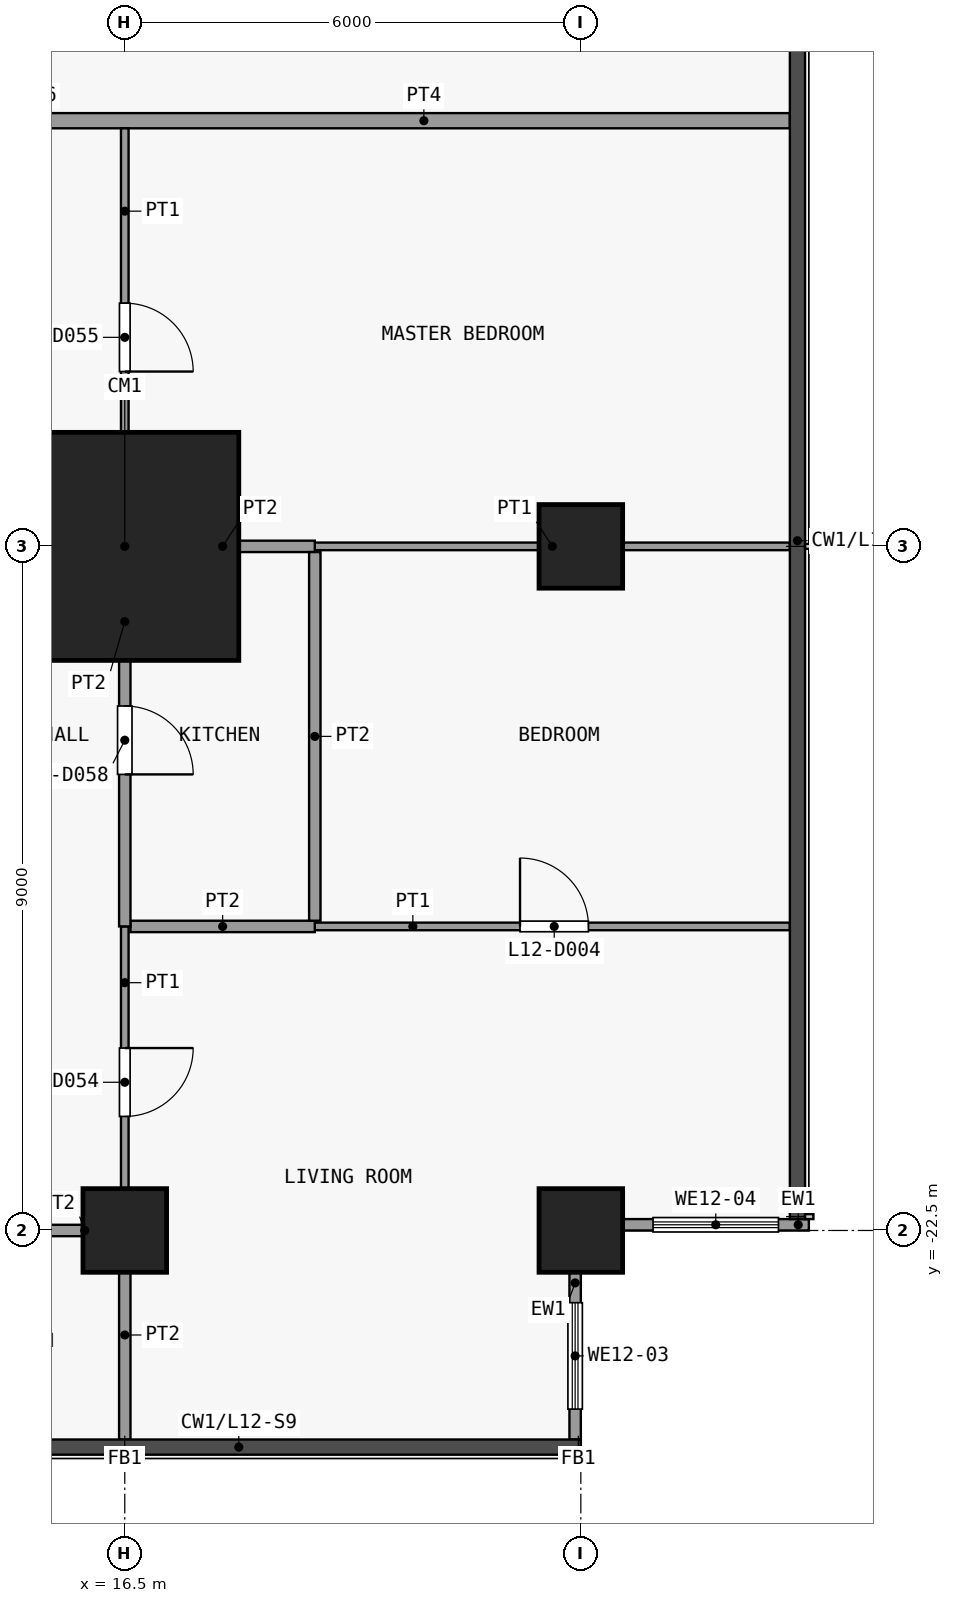
"""IFC4 building model, lengths in metres.
Left out: names, types, materials, properties, quantities, classifications, styles, units other than length and angle.
Written with IfcOpenShell. Run it as: python <this file> out.ifc"""

import sys

from ifc_helpers import new_model, si_unit, direction, frame, frame_2d, origin, origin_2d, place, context, subcontext, project, spatial, rectangle, extrude, element, fill, save


model = new_model("IFC4")
c1 = context("Model", 3, precision=1e-05, world=origin(), true_north=direction((0.0, 1.0)))
c2 = subcontext(c1, "Body", "Model", "MODEL_VIEW")
j1 = project(units=[si_unit("LENGTHUNIT", "METRE"), si_unit("PLANEANGLEUNIT", "RADIAN")], contexts=[c1])
p1 = place(None, origin())
s1 = spatial("IfcSite", under=j1, at=p1, CompositionType="ELEMENT")
p2 = place(p1, origin())
s2 = spatial("IfcBuilding", under=s1, at=p2, CompositionType="ELEMENT")
p3 = place(p2, frame((0.0, 0.0, 54.1)))
s3 = spatial("IfcBuildingStorey", under=s2, at=p3, CompositionType="ELEMENT", Elevation=54.1)
p4 = place(p3, frame((16.5, -22.5, 0.0), z_axis=(0.0, 0.0, 1.0), x_axis=(1.0, 0.0, 0.0)))
e1 = element("IfcColumn", 1, at=p4, inside=s3, PredefinedType="COLUMN", context=c2, shape_type="SweptSolid", body=[
    extrude(rectangle(XDim=1.1, YDim=1.1, at=origin_2d()), origin(), (0.0, 0.0, 1.0), 3.6),
])
p5 = place(p3, frame((16.5, -13.5, 0.0), z_axis=(0.0, 0.0, 1.0), x_axis=(1.0, 0.0, 0.0)))
e2 = element("IfcColumn", 2, at=p5, inside=s3, PredefinedType="COLUMN", context=c2, shape_type="SweptSolid", body=[
    extrude(rectangle(XDim=3.0, YDim=3.0, at=origin_2d()), origin(), (0.0, 0.0, 1.0), 3.6),
])
for number, where, z_axis, x_axis in (
    (3, (22.5, -22.5, 0.0), (0.0, 0.0, 1.0), (1.0, 0.0, 0.0)),
    (4, (22.5, -13.5, 0.0), (0.0, 0.0, 1.0), (1.0, 0.0, 0.0)),
):
    element("IfcColumn", number, at=place(p3, frame(where, z_axis=z_axis, x_axis=x_axis)), inside=s3, PredefinedType="COLUMN", context=c2, shape_type="SweptSolid", body=[
        extrude(rectangle(XDim=1.1, YDim=1.1, at=origin_2d()), origin(), (0.0, 0.0, 1.0), 3.6),
    ])
p6 = place(p3, frame((22.425, -23.05, 0.0), z_axis=(0.0, 0.0, 1.0), x_axis=(0.0, -1.0, 0.0)))
e5 = element("IfcWall", 5, at=p6, inside=s3, PredefinedType="SOLIDWALL", context=c2, shape_type="SweptSolid", body=[
    extrude(rectangle(XDim=2.2, YDim=0.15, at=frame_2d((1.1, 0.0))), origin(), (0.0, 0.0, 1.0), 3.3),
])
p7 = place(p6, frame((0.4, 0.0, 0.9)))
e6 = element("IfcOpeningElement", 6, at=p7, cuts=e5, PredefinedType="OPENING", context=c2, shape_type="SweptSolid", body=[
    extrude(rectangle(XDim=1.4, YDim=2.4, at=frame_2d((0.7, 1.2))), frame((0.0, 0.085, 0.0), z_axis=(0.0, -1.0, 0.0), x_axis=(1.0, 0.0, 0.0)), (0.0, 0.0, 1.0), 0.17),
])
p8 = place(p3, frame((25.5, -22.425, 0.0), z_axis=(0.0, 0.0, 1.0), x_axis=(-1.0, 0.0, 0.0)))
e7 = element("IfcWall", 7, at=p8, inside=s3, PredefinedType="SOLIDWALL", context=c2, shape_type="SweptSolid", body=[
    extrude(rectangle(XDim=2.45, YDim=0.15, at=frame_2d((1.225, 0.0))), origin(), (0.0, 0.0, 1.0), 3.3),
])
p9 = place(p8, frame((0.4, 0.0, 0.9)))
e8 = element("IfcOpeningElement", 8, at=p9, cuts=e7, PredefinedType="OPENING", context=c2, shape_type="SweptSolid", body=[
    extrude(rectangle(XDim=1.65, YDim=2.4, at=frame_2d((0.825, 1.2))), frame((0.0, 0.085, 0.0), z_axis=(0.0, -1.0, 0.0), x_axis=(1.0, 0.0, 0.0)), (0.0, 0.0, 1.0), 0.17),
])
p10 = place(p3, frame((13.5, -22.5, 0.0), z_axis=(0.0, 0.0, 1.0), x_axis=(1.0, 0.0, 0.0)))
e9 = element("IfcWall", 9, at=p10, inside=s3, PredefinedType="PARTITIONING", context=c2, shape_type="SweptSolid", body=[
    extrude(rectangle(XDim=2.925, YDim=0.15, at=frame_2d((1.462, 0.0))), origin(), (0.0, 0.0, 1.0), 3.3),
])
p11 = place(p10, frame((1.0, 0.0, 0.0)))
e10 = element("IfcOpeningElement", 10, at=p11, cuts=e9, PredefinedType="OPENING", context=c2, shape_type="SweptSolid", body=[
    extrude(rectangle(XDim=0.9, YDim=2.1, at=frame_2d((0.45, 1.05))), frame((0.0, 0.085, 0.0), z_axis=(0.0, -1.0, 0.0), x_axis=(1.0, 0.0, 0.0)), (0.0, 0.0, 1.0), 0.17),
])
p12 = place(p3, frame((19.0, -18.5, 0.0), z_axis=(0.0, 0.0, 1.0), x_axis=(1.0, 0.0, 0.0)))
e11 = element("IfcWall", 11, at=p12, inside=s3, PredefinedType="PARTITIONING", context=c2, shape_type="SweptSolid", body=[
    extrude(rectangle(XDim=6.25, YDim=0.1, at=frame_2d((3.125, 0.0))), origin(), (0.0, 0.0, 1.0), 3.3),
])
p13 = place(p12, frame((2.7, 0.0, 0.0)))
e12 = element("IfcOpeningElement", 12, at=p13, cuts=e11, PredefinedType="OPENING", context=c2, shape_type="SweptSolid", body=[
    extrude(rectangle(XDim=0.9, YDim=2.1, at=frame_2d((0.45, 1.05))), frame((0.0, 0.06, 0.0), z_axis=(0.0, -1.0, 0.0), x_axis=(1.0, 0.0, 0.0)), (0.0, 0.0, 1.0), 0.12),
])
p14 = place(p3, frame((16.575, -18.5, 0.0), z_axis=(0.0, 0.0, 1.0), x_axis=(1.0, 0.0, 0.0)))
e13 = element("IfcWall", 13, at=p14, inside=s3, PredefinedType="PARTITIONING", context=c2, shape_type="SweptSolid", body=[
    extrude(rectangle(XDim=2.425, YDim=0.15, at=frame_2d((1.212, 0.0))), origin(), (0.0, 0.0, 1.0), 3.3),
])
p15 = place(p3, frame((19.0, -13.5, 0.0), z_axis=(0.0, 0.0, 1.0), x_axis=(1.0, 0.0, 0.0)))
e14 = element("IfcWall", 14, at=p15, inside=s3, PredefinedType="PARTITIONING", context=c2, shape_type="SweptSolid", body=[
    extrude(rectangle(XDim=6.25, YDim=0.1, at=frame_2d((3.125, 0.0))), origin(), (0.0, 0.0, 1.0), 3.3),
])
p16 = place(p3, frame((16.575, -13.5, 0.0), z_axis=(0.0, 0.0, 1.0), x_axis=(1.0, 0.0, 0.0)))
e15 = element("IfcWall", 15, at=p16, inside=s3, PredefinedType="PARTITIONING", context=c2, shape_type="SweptSolid", body=[
    extrude(rectangle(XDim=2.425, YDim=0.15, at=frame_2d((1.212, 0.0))), origin(), (0.0, 0.0, 1.0), 3.3),
])
p17 = place(p3, frame((13.5, -7.9, 0.0), z_axis=(0.0, 0.0, 1.0), x_axis=(1.0, 0.0, 0.0)))
e16 = element("IfcWall", 16, at=p17, inside=s3, PredefinedType="PARTITIONING", context=c2, shape_type="SweptSolid", body=[
    extrude(rectangle(XDim=11.75, YDim=0.2, at=frame_2d((5.875, 0.0))), origin(), (0.0, 0.0, 1.0), 3.3),
])
p18 = place(p17, frame((1.0, 0.0, 0.0)))
e17 = element("IfcOpeningElement", 17, at=p18, cuts=e16, PredefinedType="OPENING", context=c2, shape_type="SweptSolid", body=[
    extrude(rectangle(XDim=1.0, YDim=2.1, at=frame_2d((0.5, 1.05))), frame((0.0, 0.11, 0.0), z_axis=(0.0, -1.0, 0.0), x_axis=(1.0, 0.0, 0.0)), (0.0, 0.0, 1.0), 0.22),
])
p19 = place(p3, frame((16.5, -22.5, 0.0), z_axis=(0.0, 0.0, 1.0), x_axis=(0.0, 1.0, 0.0)))
e18 = element("IfcWall", 18, at=p19, inside=s3, PredefinedType="PARTITIONING", context=c2, shape_type="SweptSolid", body=[
    extrude(rectangle(XDim=4.0, YDim=0.1, at=frame_2d((2.0, 0.0))), origin(), (0.0, 0.0, 1.0), 3.3),
])
p20 = place(p19, frame((1.5, 0.0, 0.0)))
e19 = element("IfcOpeningElement", 19, at=p20, cuts=e18, PredefinedType="OPENING", context=c2, shape_type="SweptSolid", body=[
    extrude(rectangle(XDim=0.9, YDim=2.1, at=frame_2d((0.45, 1.05))), frame((0.0, 0.06, 0.0), z_axis=(0.0, -1.0, 0.0), x_axis=(1.0, 0.0, 0.0)), (0.0, 0.0, 1.0), 0.12),
])
p21 = place(p3, frame((16.5, -13.5, 0.0), z_axis=(0.0, 0.0, 1.0), x_axis=(0.0, 1.0, 0.0)))
e20 = element("IfcWall", 20, at=p21, inside=s3, PredefinedType="PARTITIONING", context=c2, shape_type="SweptSolid", body=[
    extrude(rectangle(XDim=5.5, YDim=0.1, at=frame_2d((2.75, 0.0))), origin(), (0.0, 0.0, 1.0), 3.3),
])
p22 = place(p21, frame((2.3, 0.0, 0.0)))
e21 = element("IfcOpeningElement", 21, at=p22, cuts=e20, PredefinedType="OPENING", context=c2, shape_type="SweptSolid", body=[
    extrude(rectangle(XDim=0.9, YDim=2.1, at=frame_2d((0.45, 1.05))), frame((0.0, 0.06, 0.0), z_axis=(0.0, -1.0, 0.0), x_axis=(1.0, 0.0, 0.0)), (0.0, 0.0, 1.0), 0.12),
])
p23 = place(p3, frame((16.5, -25.25, 0.0), z_axis=(0.0, 0.0, 1.0), x_axis=(0.0, 1.0, 0.0)))
e22 = element("IfcWall", 22, at=p23, inside=s3, PredefinedType="PARTITIONING", context=c2, shape_type="SweptSolid", body=[
    extrude(rectangle(XDim=2.75, YDim=0.15, at=frame_2d((1.375, 0.0))), origin(), (0.0, 0.0, 1.0), 3.3),
])
p24 = place(p3, frame((16.5, -18.5, 0.0), z_axis=(0.0, 0.0, 1.0), x_axis=(0.0, 1.0, 0.0)))
e23 = element("IfcWall", 23, at=p24, inside=s3, PredefinedType="PARTITIONING", context=c2, shape_type="SweptSolid", body=[
    extrude(rectangle(XDim=5.0, YDim=0.15, at=frame_2d((2.5, 0.0))), origin(), (0.0, 0.0, 1.0), 3.3),
])
p25 = place(p24, frame((2.0, 0.0, 0.0)))
e24 = element("IfcOpeningElement", 24, at=p25, cuts=e23, PredefinedType="OPENING", context=c2, shape_type="SweptSolid", body=[
    extrude(rectangle(XDim=0.9, YDim=2.1, at=frame_2d((0.45, 1.05))), frame((0.0, 0.085, 0.0), z_axis=(0.0, -1.0, 0.0), x_axis=(1.0, 0.0, 0.0)), (0.0, 0.0, 1.0), 0.17),
])
p26 = place(p3, frame((19.0, -18.425, 0.0), z_axis=(0.0, 0.0, 1.0), x_axis=(0.0, 1.0, 0.0)))
e25 = element("IfcWall", 25, at=p26, inside=s3, PredefinedType="PARTITIONING", context=c2, shape_type="SweptSolid", body=[
    extrude(rectangle(XDim=4.85, YDim=0.15, at=frame_2d((2.425, 0.0))), origin(), (0.0, 0.0, 1.0), 3.3),
])
p27 = place(p7, origin())
e26 = element("IfcWindow", 26, at=p27, inside=s3, PartitioningType="SINGLE_PANEL", PredefinedType="WINDOW", context=c2, shape_type="SweptSolid", body=[
    extrude(rectangle(XDim=1.4, YDim=2.4, at=frame_2d((0.7, 1.2))), frame((0.0, 0.03, 0.0), z_axis=(0.0, -1.0, 0.0), x_axis=(1.0, 0.0, 0.0)), (0.0, 0.0, 1.0), 0.06),
])
fill(e6, e26)
p28 = place(p9, origin())
e27 = element("IfcWindow", 27, at=p28, inside=s3, PartitioningType="SINGLE_PANEL", PredefinedType="WINDOW", context=c2, shape_type="SweptSolid", body=[
    extrude(rectangle(XDim=1.65, YDim=2.4, at=frame_2d((0.825, 1.2))), frame((0.0, 0.03, 0.0), z_axis=(0.0, -1.0, 0.0), x_axis=(1.0, 0.0, 0.0)), (0.0, 0.0, 1.0), 0.06),
])
fill(e8, e27)
p29 = place(p13, origin())
e28 = element("IfcDoor", 28, at=p29, inside=s3, OperationType="SINGLE_SWING_RIGHT", PredefinedType="DOOR", context=c2, shape_type="SweptSolid", body=[
    extrude(rectangle(XDim=0.9, YDim=2.1, at=frame_2d((0.45, 1.05))), frame((0.0, 0.025, 0.0), z_axis=(0.0, -1.0, 0.0), x_axis=(1.0, 0.0, 0.0)), (0.0, 0.0, 1.0), 0.05),
])
fill(e12, e28)
p30 = place(p20, origin())
e29 = element("IfcDoor", 29, at=p30, inside=s3, OperationType="SINGLE_SWING_RIGHT", PredefinedType="DOOR", context=c2, shape_type="SweptSolid", body=[
    extrude(rectangle(XDim=0.9, YDim=2.1, at=frame_2d((0.45, 1.05))), frame((0.0, 0.025, 0.0), z_axis=(0.0, -1.0, 0.0), x_axis=(1.0, 0.0, 0.0)), (0.0, 0.0, 1.0), 0.05),
])
fill(e19, e29)
p31 = place(p22, origin())
e30 = element("IfcDoor", 30, at=p31, inside=s3, OperationType="SINGLE_SWING_LEFT", PredefinedType="DOOR", context=c2, shape_type="SweptSolid", body=[
    extrude(rectangle(XDim=0.9, YDim=2.1, at=frame_2d((0.45, 1.05))), frame((0.0, 0.025, 0.0), z_axis=(0.0, -1.0, 0.0), x_axis=(1.0, 0.0, 0.0)), (0.0, 0.0, 1.0), 0.05),
])
fill(e21, e30)
p32 = place(p25, origin())
e31 = element("IfcDoor", 31, at=p32, inside=s3, OperationType="SINGLE_SWING_LEFT", PredefinedType="DOOR", context=c2, shape_type="SweptSolid", body=[
    extrude(rectangle(XDim=0.9, YDim=2.1, at=frame_2d((0.45, 1.05))), frame((0.0, 0.025, 0.0), z_axis=(0.0, -1.0, 0.0), x_axis=(1.0, 0.0, 0.0)), (0.0, 0.0, 1.0), 0.05),
])
fill(e24, e31)
save(model, sys.argv[1])
